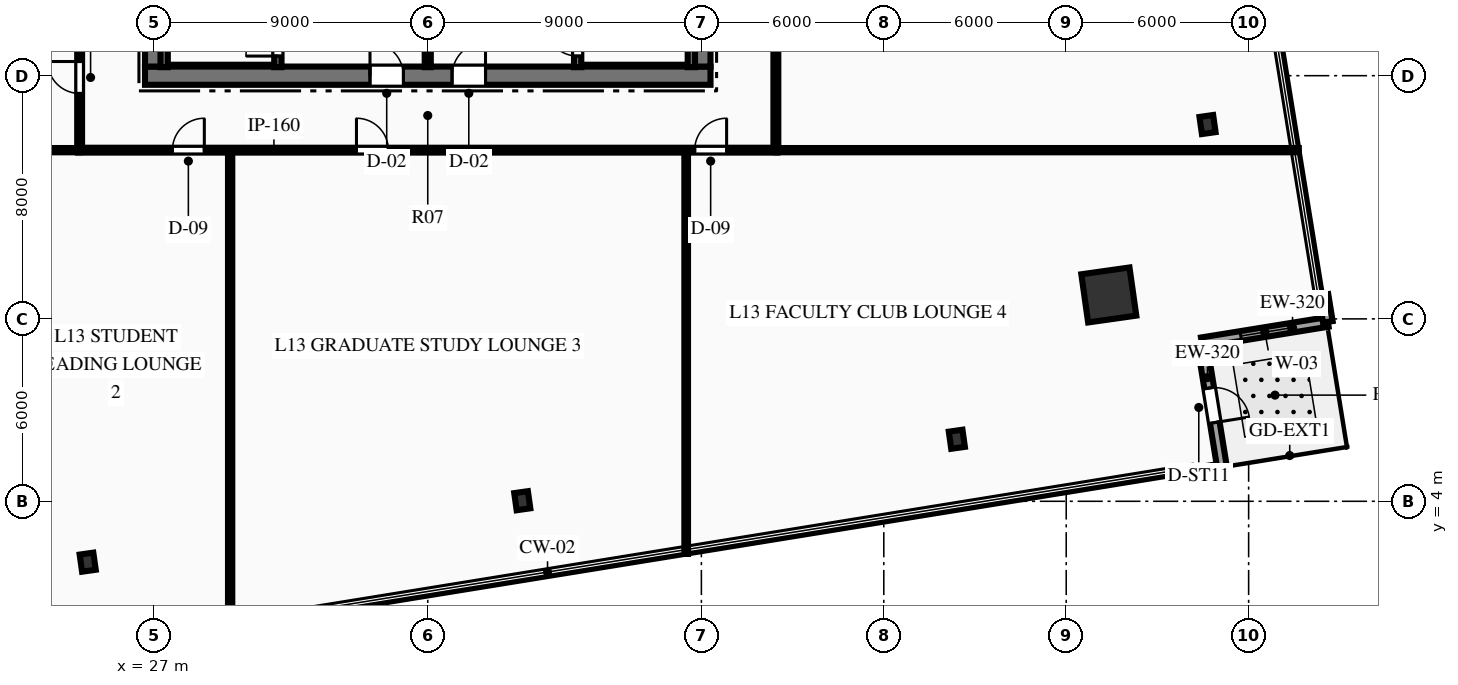
"""IFC4 building model, lengths in metres.
Left out: names, types, materials, properties, quantities, classifications, styles, units other than length and angle.
Written with IfcOpenShell. Run it as: python <this file> out.ifc"""

import sys

from ifc_helpers import new_model, si_unit, direction, frame, frame_2d, origin, origin_2d, place, context, subcontext, project, spatial, rectangle, hollow_rectangle, i_section, extrude, element, fill, save


model = new_model("IFC4")
c1 = context("Model", 3, precision=1e-05, world=origin(), true_north=direction((0.0, 1.0)))
c2 = subcontext(c1, "Body", "Model", "MODEL_VIEW")
j1 = project(units=[si_unit("LENGTHUNIT", "METRE"), si_unit("PLANEANGLEUNIT", "RADIAN")], contexts=[c1])
p1 = place(None, origin())
s1 = spatial("IfcSite", under=j1, at=p1, CompositionType="ELEMENT")
p2 = place(p1, origin())
s2 = spatial("IfcBuilding", under=s1, at=p2, CompositionType="ELEMENT")
p3 = place(p2, frame((0.0, 0.0, 58.95)))
s3 = spatial("IfcBuildingStorey", under=s2, at=p3, CompositionType="ELEMENT", Elevation=58.95)
p4 = place(p3, frame((26.7, 18.0, 0.0), z_axis=(0.0, 0.0, 1.0), x_axis=(1.0, 0.0, 0.0)))
e1 = element("IfcWall", 1, at=p4, inside=s3, PredefinedType="SHEAR", context=c2, shape_type="SweptSolid", body=[
    extrude(rectangle(XDim=18.6, YDim=0.6, at=frame_2d((9.3, 0.0))), origin(), (0.0, 0.0, 1.0), 3.75),
])
p5 = place(p4, frame((7.4, 0.0, 0.0)))
e2 = element("IfcOpeningElement", 2, at=p5, cuts=e1, PredefinedType="OPENING", context=c2, shape_type="SweptSolid", body=[
    extrude(rectangle(XDim=1.1, YDim=2.15, at=frame_2d((0.55, 1.075))), frame((0.0, 0.31, 0.0), z_axis=(0.0, -1.0, 0.0), x_axis=(1.0, 0.0, 0.0)), (0.0, 0.0, 1.0), 0.62),
])
p6 = place(p4, frame((10.1, 0.0, 0.0)))
e3 = element("IfcOpeningElement", 3, at=p6, cuts=e1, PredefinedType="OPENING", context=c2, shape_type="SweptSolid", body=[
    extrude(rectangle(XDim=1.1, YDim=2.15, at=frame_2d((0.55, 1.075))), frame((0.0, 0.31, 0.0), z_axis=(0.0, -1.0, 0.0), x_axis=(1.0, 0.0, 0.0)), (0.0, 0.0, 1.0), 0.62),
])
p7 = place(p3, frame((27.0, 18.3, 0.0), z_axis=(0.0, 0.0, 1.0), x_axis=(0.0, 1.0, 0.0)))
e4 = element("IfcWall", 4, at=p7, inside=s3, PredefinedType="SHEAR", context=c2, shape_type="SweptSolid", body=[
    extrude(rectangle(XDim=15.4, YDim=0.6, at=frame_2d((7.7, 0.0))), origin(), (0.0, 0.0, 1.0), 3.75),
])
p8 = place(p7, frame((9.94, 0.0, 0.0)))
e5 = element("IfcOpeningElement", 5, at=p8, cuts=e4, PredefinedType="OPENING", context=c2, shape_type="SweptSolid", body=[
    extrude(rectangle(XDim=1.4, YDim=2.2, at=frame_2d((0.7, 1.1))), frame((0.0, 0.31, 0.0), z_axis=(0.0, -1.0, 0.0), x_axis=(1.0, 0.0, 0.0)), (0.0, 0.0, 1.0), 0.62),
])
p9 = place(p3, frame((45.0, 18.3, 0.0), z_axis=(0.0, 0.0, 1.0), x_axis=(0.0, 1.0, 0.0)))
e6 = element("IfcWall", 6, at=p9, inside=s3, PredefinedType="SHEAR", context=c2, shape_type="SweptSolid", body=[
    extrude(rectangle(XDim=15.4, YDim=0.6, at=frame_2d((7.7, 0.0))), origin(), (0.0, 0.0, 1.0), 3.75),
])
p10 = place(p9, frame((9.94, 0.0, 0.0)))
e7 = element("IfcOpeningElement", 7, at=p10, cuts=e6, PredefinedType="OPENING", context=c2, shape_type="SweptSolid", body=[
    extrude(rectangle(XDim=1.4, YDim=2.2, at=frame_2d((0.7, 1.1))), frame((0.0, 0.31, 0.0), z_axis=(0.0, -1.0, 0.0), x_axis=(1.0, 0.0, 0.0)), (0.0, 0.0, 1.0), 0.62),
])
p11 = place(p3, frame((31.07, 18.28, 0.0), z_axis=(0.0, 0.0, 1.0), x_axis=(0.0, 1.0, 0.0)))
e8 = element("IfcWall", 8, at=p11, inside=s3, PredefinedType="SHEAR", context=c2, shape_type="SweptSolid", body=[
    extrude(rectangle(XDim=8.26, YDim=0.24, at=frame_2d((4.13, 0.0))), origin(), (0.0, 0.0, 1.0), 3.75),
])
p12 = place(p11, frame((0.365, 0.0, 0.0)))
e9 = element("IfcOpeningElement", 9, at=p12, cuts=e8, PredefinedType="OPENING", context=c2, shape_type="SweptSolid", body=[
    extrude(rectangle(XDim=1.05, YDim=2.15, at=frame_2d((0.525, 1.075))), frame((0.0, 0.13, 0.0), z_axis=(0.0, -1.0, 0.0), x_axis=(1.0, 0.0, 0.0)), (0.0, 0.0, 1.0), 0.26),
])
p13 = place(p3, frame((27.33, 18.28, 0.0), z_axis=(0.0, 0.0, 1.0), x_axis=(0.0, 1.0, 0.0)))
e10 = element("IfcWall", 10, at=p13, inside=s3, PredefinedType="SHEAR", context=c2, shape_type="SweptSolid", body=[
    extrude(rectangle(XDim=8.26, YDim=0.24, at=frame_2d((4.13, 0.0))), origin(), (0.0, 0.0, 1.0), 3.75),
])
p14 = place(p3, frame((40.93, 18.28, 0.0), z_axis=(0.0, 0.0, 1.0), x_axis=(0.0, 1.0, 0.0)))
e11 = element("IfcWall", 11, at=p14, inside=s3, PredefinedType="SHEAR", context=c2, shape_type="SweptSolid", body=[
    extrude(rectangle(XDim=8.26, YDim=0.24, at=frame_2d((4.13, 0.0))), origin(), (0.0, 0.0, 1.0), 3.75),
])
p15 = place(p14, frame((0.365, 0.0, 0.0)))
e12 = element("IfcOpeningElement", 12, at=p15, cuts=e11, PredefinedType="OPENING", context=c2, shape_type="SweptSolid", body=[
    extrude(rectangle(XDim=1.05, YDim=2.15, at=frame_2d((0.525, 1.075))), frame((0.0, 0.13, 0.0), z_axis=(0.0, -1.0, 0.0), x_axis=(1.0, 0.0, 0.0)), (0.0, 0.0, 1.0), 0.26),
])
p16 = place(p3, frame((44.67, 18.28, 0.0), z_axis=(0.0, 0.0, 1.0), x_axis=(0.0, 1.0, 0.0)))
e13 = element("IfcWall", 13, at=p16, inside=s3, PredefinedType="SHEAR", context=c2, shape_type="SweptSolid", body=[
    extrude(rectangle(XDim=8.26, YDim=0.24, at=frame_2d((4.13, 0.0))), origin(), (0.0, 0.0, 1.0), 3.75),
])
p17 = place(p3, frame((58.401, 10.787, 0.0), z_axis=(0.0, 0.0, 1.0), x_axis=(0.990146240249, 0.140037219771, 0.0)))
e14 = element("IfcColumn", 14, at=p17, inside=s3, PredefinedType="COLUMN", context=c2, shape_type="SweptSolid", body=[
    extrude(hollow_rectangle(XDim=1.6, YDim=1.6, WallThickness=0.08, at=origin_2d()), origin(), (0.0, 0.0, 1.0), 3.75),
])
for number, where, z_axis, x_axis in (
    (15, (24.815, 1.997, 0.0), (0.0, 0.0, 1.0), (0.99, 0.14, 0.0)),
    (16, (39.109, 4.019, 0.0), (0.0, 0.0, 1.0), (0.99, 0.14, 0.0)),
    (17, (53.403, 6.04, 0.0), (0.0, 0.0, 1.0), (0.99, 0.14, 0.0)),
    (18, (61.648, 16.393, 0.0), (0.0, 0.0, 1.0), (0.99, 0.14, 0.0)),
):
    element("IfcColumn", number, at=place(p3, frame(where, z_axis=z_axis, x_axis=x_axis)), inside=s3, PredefinedType="COLUMN", context=c2, shape_type="SweptSolid", body=[
        extrude(i_section(OverallWidth=0.454, OverallDepth=0.569, WebThickness=0.078, FlangeThickness=0.125, at=origin_2d()), origin(), (0.0, 0.0, 1.0), 3.75),
    ])
p18 = place(p3, frame((62.13, 5.084, 0.0), z_axis=(0.0, 0.0, 1.0), x_axis=(-0.987110110933, -0.160042584625, 0.0)))
e19 = element("IfcWall", 19, at=p18, inside=s3, PredefinedType="STANDARD", context=c2, shape_type="SweptSolid", body=[
    extrude(rectangle(XDim=0.9, YDim=0.32, at=frame_2d((0.45, 0.0))), origin(), (0.0, 0.0, 1.0), 3.44),
])
p19 = place(p3, frame((61.459, 9.229, 0.0), z_axis=(0.0, 0.0, 1.0), x_axis=(0.159919601167, -0.987130042681, 0.0)))
e20 = element("IfcWall", 20, at=p19, inside=s3, PredefinedType="STANDARD", context=c2, shape_type="SweptSolid", body=[
    extrude(rectangle(XDim=4.2, YDim=0.32, at=frame_2d((2.1, 0.0))), origin(), (0.0, 0.0, 1.0), 3.44),
])
p20 = place(p19, frame((1.525, 0.0, 0.0)))
e21 = element("IfcOpeningElement", 21, at=p20, cuts=e20, PredefinedType="OPENING", context=c2, shape_type="SweptSolid", body=[
    extrude(rectangle(XDim=1.15, YDim=2.2, at=frame_2d((0.575, 1.1))), frame((0.0, 0.17, 0.0), z_axis=(0.0, -1.0, 0.0), x_axis=(1.0, 0.0, 0.0)), (0.0, 0.0, 1.0), 0.34),
])
p21 = place(p3, frame((65.605, 9.901, 0.0), z_axis=(0.0, 0.0, 1.0), x_axis=(-0.987131529222, -0.159910424973, 0.0)))
e22 = element("IfcWall", 22, at=p21, inside=s3, PredefinedType="STANDARD", context=c2, shape_type="SweptSolid", body=[
    extrude(rectangle(XDim=4.2, YDim=0.32, at=frame_2d((2.1, 0.0))), origin(), (0.0, 0.0, 1.0), 3.44),
])
p22 = place(p21, frame((1.3, 0.0, 0.85)))
e23 = element("IfcOpeningElement", 23, at=p22, cuts=e22, PredefinedType="OPENING", context=c2, shape_type="SweptSolid", body=[
    extrude(rectangle(XDim=1.6, YDim=2.1, at=frame_2d((0.8, 1.05))), frame((0.0, 0.17, 0.0), z_axis=(0.0, -1.0, 0.0), x_axis=(1.0, 0.0, 0.0)), (0.0, 0.0, 1.0), 0.34),
])
p23 = place(p3, frame((65.461, 10.79, 0.0), z_axis=(0.0, 0.0, 1.0), x_axis=(0.160042584625, -0.987110110933, 0.0)))
e24 = element("IfcWall", 24, at=p23, inside=s3, PredefinedType="STANDARD", context=c2, shape_type="SweptSolid", body=[
    extrude(rectangle(XDim=0.9, YDim=0.32, at=frame_2d((0.45, 0.0))), origin(), (0.0, 0.0, 1.0), 3.44),
])
p24 = place(p3, frame((36.0, 18.28, 0.0), z_axis=(0.0, 0.0, 1.0), x_axis=(0.0, 1.0, 0.0)))
e25 = element("IfcWall", 25, at=p24, inside=s3, PredefinedType="PARTITIONING", context=c2, shape_type="SweptSolid", body=[
    extrude(rectangle(XDim=3.77, YDim=0.2, at=frame_2d((1.885, 0.0))), origin(), (0.0, 0.0, 1.0), 3.44),
])
p25 = place(p3, frame((24.5, 15.55, 0.0), z_axis=(0.0, 0.0, 1.0), x_axis=(1.0, 0.0, 0.0)))
e26 = element("IfcWall", 26, at=p25, inside=s3, PredefinedType="PARTITIONING", context=c2, shape_type="SweptSolid", body=[
    extrude(rectangle(XDim=23.0, YDim=0.16, at=frame_2d((11.5, 0.0))), origin(), (0.0, 0.0, 1.0), 3.44),
])
p26 = place(p25, frame((3.101, 0.0, 0.0)))
e27 = element("IfcOpeningElement", 27, at=p26, cuts=e26, PredefinedType="OPENING", context=c2, shape_type="SweptSolid", body=[
    extrude(rectangle(XDim=1.05, YDim=2.15, at=frame_2d((0.525, 1.075))), frame((0.0, 0.09, 0.0), z_axis=(0.0, -1.0, 0.0), x_axis=(1.0, 0.0, 0.0)), (0.0, 0.0, 1.0), 0.18),
])
p27 = place(p25, frame((9.155, 0.0, 0.0)))
e28 = element("IfcOpeningElement", 28, at=p27, cuts=e26, PredefinedType="OPENING", context=c2, shape_type="SweptSolid", body=[
    extrude(rectangle(XDim=1.05, YDim=2.15, at=frame_2d((0.525, 1.075))), frame((0.0, 0.09, 0.0), z_axis=(0.0, -1.0, 0.0), x_axis=(1.0, 0.0, 0.0)), (0.0, 0.0, 1.0), 0.18),
])
p28 = place(p25, frame((20.28, 0.0, 0.0)))
e29 = element("IfcOpeningElement", 29, at=p28, cuts=e26, PredefinedType="OPENING", context=c2, shape_type="SweptSolid", body=[
    extrude(rectangle(XDim=1.05, YDim=2.15, at=frame_2d((0.525, 1.075))), frame((0.0, 0.09, 0.0), z_axis=(0.0, -1.0, 0.0), x_axis=(1.0, 0.0, 0.0)), (0.0, 0.0, 1.0), 0.18),
])
p29 = place(p3, frame((24.55, 15.55, 0.0), z_axis=(0.0, 0.0, 1.0), x_axis=(0.0, 1.0, 0.0)))
e30 = element("IfcWall", 30, at=p29, inside=s3, PredefinedType="PARTITIONING", context=c2, shape_type="SweptSolid", body=[
    extrude(rectangle(XDim=20.9, YDim=0.16, at=frame_2d((10.45, 0.0))), origin(), (0.0, 0.0, 1.0), 3.44),
])
p30 = place(p29, frame((1.866, 0.0, 0.0)))
e31 = element("IfcOpeningElement", 31, at=p30, cuts=e30, PredefinedType="OPENING", context=c2, shape_type="SweptSolid", body=[
    extrude(rectangle(XDim=1.05, YDim=2.15, at=frame_2d((0.525, 1.075))), frame((0.0, 0.09, 0.0), z_axis=(0.0, -1.0, 0.0), x_axis=(1.0, 0.0, 0.0)), (0.0, 0.0, 1.0), 0.18),
])
p31 = place(p29, frame((5.405, 0.0, 0.0)))
e32 = element("IfcOpeningElement", 32, at=p31, cuts=e30, PredefinedType="OPENING", context=c2, shape_type="SweptSolid", body=[
    extrude(rectangle(XDim=1.05, YDim=2.15, at=frame_2d((0.525, 1.075))), frame((0.0, 0.09, 0.0), z_axis=(0.0, -1.0, 0.0), x_axis=(1.0, 0.0, 0.0)), (0.0, 0.0, 1.0), 0.18),
])
p32 = place(p29, frame((12.581, 0.0, 0.0)))
e33 = element("IfcOpeningElement", 33, at=p32, cuts=e30, PredefinedType="OPENING", context=c2, shape_type="SweptSolid", body=[
    extrude(rectangle(XDim=1.05, YDim=2.15, at=frame_2d((0.525, 1.075))), frame((0.0, 0.09, 0.0), z_axis=(0.0, -1.0, 0.0), x_axis=(1.0, 0.0, 0.0)), (0.0, 0.0, 1.0), 0.18),
])
p33 = place(p29, frame((15.899, 0.0, 0.0)))
e34 = element("IfcOpeningElement", 34, at=p33, cuts=e30, PredefinedType="OPENING", context=c2, shape_type="SweptSolid", body=[
    extrude(rectangle(XDim=1.05, YDim=2.15, at=frame_2d((0.525, 1.075))), frame((0.0, 0.09, 0.0), z_axis=(0.0, -1.0, 0.0), x_axis=(1.0, 0.0, 0.0)), (0.0, 0.0, 1.0), 0.18),
])
p34 = place(p3, frame((47.45, 15.55, 0.0), z_axis=(0.0, 0.0, 1.0), x_axis=(0.0, 1.0, 0.0)))
e35 = element("IfcWall", 35, at=p34, inside=s3, PredefinedType="PARTITIONING", context=c2, shape_type="SweptSolid", body=[
    extrude(rectangle(XDim=20.9, YDim=0.16, at=frame_2d((10.45, 0.0))), origin(), (0.0, 0.0, 1.0), 3.44),
])
p35 = place(p34, frame((4.767, 0.0, 0.0)))
e36 = element("IfcOpeningElement", 36, at=p35, cuts=e35, PredefinedType="OPENING", context=c2, shape_type="SweptSolid", body=[
    extrude(rectangle(XDim=1.05, YDim=2.15, at=frame_2d((0.525, 1.075))), frame((0.0, 0.09, 0.0), z_axis=(0.0, -1.0, 0.0), x_axis=(1.0, 0.0, 0.0)), (0.0, 0.0, 1.0), 0.18),
])
p36 = place(p34, frame((9.205, 0.0, 0.0)))
e37 = element("IfcOpeningElement", 37, at=p36, cuts=e35, PredefinedType="OPENING", context=c2, shape_type="SweptSolid", body=[
    extrude(rectangle(XDim=1.05, YDim=2.15, at=frame_2d((0.525, 1.075))), frame((0.0, 0.09, 0.0), z_axis=(0.0, -1.0, 0.0), x_axis=(1.0, 0.0, 0.0)), (0.0, 0.0, 1.0), 0.18),
])
p37 = place(p34, frame((18.365, 0.0, 0.0)))
e38 = element("IfcOpeningElement", 38, at=p37, cuts=e35, PredefinedType="OPENING", context=c2, shape_type="SweptSolid", body=[
    extrude(rectangle(XDim=1.05, YDim=2.15, at=frame_2d((0.525, 1.075))), frame((0.0, 0.09, 0.0), z_axis=(0.0, -1.0, 0.0), x_axis=(1.0, 0.0, 0.0)), (0.0, 0.0, 1.0), 0.18),
])
p38 = place(p3, frame((10.736, 15.55, 0.0), z_axis=(0.0, 0.0, 1.0), x_axis=(1.0, 0.0, 0.0)))
e39 = element("IfcWall", 39, at=p38, inside=s3, PredefinedType="PARTITIONING", context=c2, shape_type="SweptSolid", body=[
    extrude(rectangle(XDim=13.814, YDim=0.14, at=frame_2d((6.907, 0.0))), origin(), (0.0, 0.0, 1.0), 3.44),
])
p39 = place(p38, frame((7.811, 0.0, 0.0)))
e40 = element("IfcOpeningElement", 40, at=p39, cuts=e39, PredefinedType="OPENING", context=c2, shape_type="SweptSolid", body=[
    extrude(rectangle(XDim=0.95, YDim=2.15, at=frame_2d((0.475, 1.075))), frame((0.0, 0.08, 0.0), z_axis=(0.0, -1.0, 0.0), x_axis=(1.0, 0.0, 0.0)), (0.0, 0.0, 1.0), 0.16),
])
p40 = place(p3, frame((47.45, 15.55, 0.0), z_axis=(0.0, 0.0, 1.0), x_axis=(1.0, 0.0, 0.0)))
e41 = element("IfcWall", 41, at=p40, inside=s3, PredefinedType="PARTITIONING", context=c2, shape_type="SweptSolid", body=[
    extrude(rectangle(XDim=17.199, YDim=0.14, at=frame_2d((8.6, 0.0))), origin(), (0.0, 0.0, 1.0), 3.44),
])
p41 = place(p3, frame((29.5, -0.161, 0.0), z_axis=(0.0, 0.0, 1.0), x_axis=(0.0, 1.0, 0.0)))
e42 = element("IfcWall", 42, at=p41, inside=s3, PredefinedType="PARTITIONING", context=c2, shape_type="SweptSolid", body=[
    extrude(rectangle(XDim=15.711, YDim=0.14, at=frame_2d((7.855, 0.0))), origin(), (0.0, 0.0, 1.0), 3.44),
])
p42 = place(p3, frame((44.5, 2.269, 0.0), z_axis=(0.0, 0.0, 1.0), x_axis=(0.0, 1.0, 0.0)))
e43 = element("IfcWall", 43, at=p42, inside=s3, PredefinedType="PARTITIONING", context=c2, shape_type="SweptSolid", body=[
    extrude(rectangle(XDim=13.281, YDim=0.12, at=frame_2d((6.641, 0.0))), origin(), (0.0, 0.0, 1.0), 3.44),
])
p43 = place(p20, origin())
e44 = element("IfcDoor", 44, at=p43, inside=s3, OperationType="SINGLE_SWING_RIGHT", PredefinedType="DOOR", context=c2, shape_type="SweptSolid", body=[
    extrude(rectangle(XDim=1.15, YDim=2.2, at=frame_2d((0.575, 1.1))), frame((0.0, 0.025, 0.0), z_axis=(0.0, -1.0, 0.0), x_axis=(1.0, 0.0, 0.0)), (0.0, 0.0, 1.0), 0.05),
])
fill(e21, e44)
p44 = place(p22, origin())
e45 = element("IfcWindow", 45, at=p44, inside=s3, PartitioningType="SINGLE_PANEL", PredefinedType="WINDOW", context=c2, shape_type="SweptSolid", body=[
    extrude(rectangle(XDim=1.6, YDim=2.1, at=frame_2d((0.8, 1.05))), frame((0.0, 0.03, 0.0), z_axis=(0.0, -1.0, 0.0), x_axis=(1.0, 0.0, 0.0)), (0.0, 0.0, 1.0), 0.06),
])
fill(e23, e45)
p45 = place(p12, origin())
e46 = element("IfcDoor", 46, at=p45, inside=s3, OperationType="SINGLE_SWING_LEFT", PredefinedType="DOOR", context=c2, shape_type="SweptSolid", body=[
    extrude(rectangle(XDim=1.05, YDim=2.15, at=frame_2d((0.525, 1.075))), frame((0.0, 0.025, 0.0), z_axis=(0.0, -1.0, 0.0), x_axis=(1.0, 0.0, 0.0)), (0.0, 0.0, 1.0), 0.05),
])
fill(e9, e46)
p46 = place(p15, origin())
e47 = element("IfcDoor", 47, at=p46, inside=s3, OperationType="SINGLE_SWING_RIGHT", PredefinedType="DOOR", context=c2, shape_type="SweptSolid", body=[
    extrude(rectangle(XDim=1.05, YDim=2.15, at=frame_2d((0.525, 1.075))), frame((0.0, 0.025, 0.0), z_axis=(0.0, -1.0, 0.0), x_axis=(1.0, 0.0, 0.0)), (0.0, 0.0, 1.0), 0.05),
])
fill(e12, e47)
p47 = place(p5, origin())
e48 = element("IfcDoor", 48, at=p47, inside=s3, OperationType="SINGLE_SWING_LEFT", PredefinedType="DOOR", context=c2, shape_type="SweptSolid", body=[
    extrude(rectangle(XDim=1.1, YDim=2.15, at=frame_2d((0.55, 1.075))), frame((0.0, 0.025, 0.0), z_axis=(0.0, -1.0, 0.0), x_axis=(1.0, 0.0, 0.0)), (0.0, 0.0, 1.0), 0.05),
])
fill(e2, e48)
p48 = place(p6, origin())
e49 = element("IfcDoor", 49, at=p48, inside=s3, OperationType="SINGLE_SWING_RIGHT", PredefinedType="DOOR", context=c2, shape_type="SweptSolid", body=[
    extrude(rectangle(XDim=1.1, YDim=2.15, at=frame_2d((0.55, 1.075))), frame((0.0, 0.025, 0.0), z_axis=(0.0, -1.0, 0.0), x_axis=(1.0, 0.0, 0.0)), (0.0, 0.0, 1.0), 0.05),
])
fill(e3, e49)
p49 = place(p26, origin())
e50 = element("IfcDoor", 50, at=p49, inside=s3, OperationType="SINGLE_SWING_RIGHT", PredefinedType="DOOR", context=c2, shape_type="SweptSolid", body=[
    extrude(rectangle(XDim=1.05, YDim=2.15, at=frame_2d((0.525, 1.075))), frame((0.0, 0.025, 0.0), z_axis=(0.0, -1.0, 0.0), x_axis=(1.0, 0.0, 0.0)), (0.0, 0.0, 1.0), 0.05),
])
fill(e27, e50)
p50 = place(p27, origin())
e51 = element("IfcDoor", 51, at=p50, inside=s3, OperationType="SINGLE_SWING_LEFT", PredefinedType="DOOR", context=c2, shape_type="SweptSolid", body=[
    extrude(rectangle(XDim=1.05, YDim=2.15, at=frame_2d((0.525, 1.075))), frame((0.0, 0.025, 0.0), z_axis=(0.0, -1.0, 0.0), x_axis=(1.0, 0.0, 0.0)), (0.0, 0.0, 1.0), 0.05),
])
fill(e28, e51)
p51 = place(p28, origin())
e52 = element("IfcDoor", 52, at=p51, inside=s3, OperationType="SINGLE_SWING_RIGHT", PredefinedType="DOOR", context=c2, shape_type="SweptSolid", body=[
    extrude(rectangle(XDim=1.05, YDim=2.15, at=frame_2d((0.525, 1.075))), frame((0.0, 0.025, 0.0), z_axis=(0.0, -1.0, 0.0), x_axis=(1.0, 0.0, 0.0)), (0.0, 0.0, 1.0), 0.05),
])
fill(e29, e52)
p52 = place(p30, origin())
e53 = element("IfcDoor", 53, at=p52, inside=s3, OperationType="SINGLE_SWING_RIGHT", PredefinedType="DOOR", context=c2, shape_type="SweptSolid", body=[
    extrude(rectangle(XDim=1.05, YDim=2.15, at=frame_2d((0.525, 1.075))), frame((0.0, 0.025, 0.0), z_axis=(0.0, -1.0, 0.0), x_axis=(1.0, 0.0, 0.0)), (0.0, 0.0, 1.0), 0.05),
])
fill(e31, e53)
save(model, sys.argv[1])
